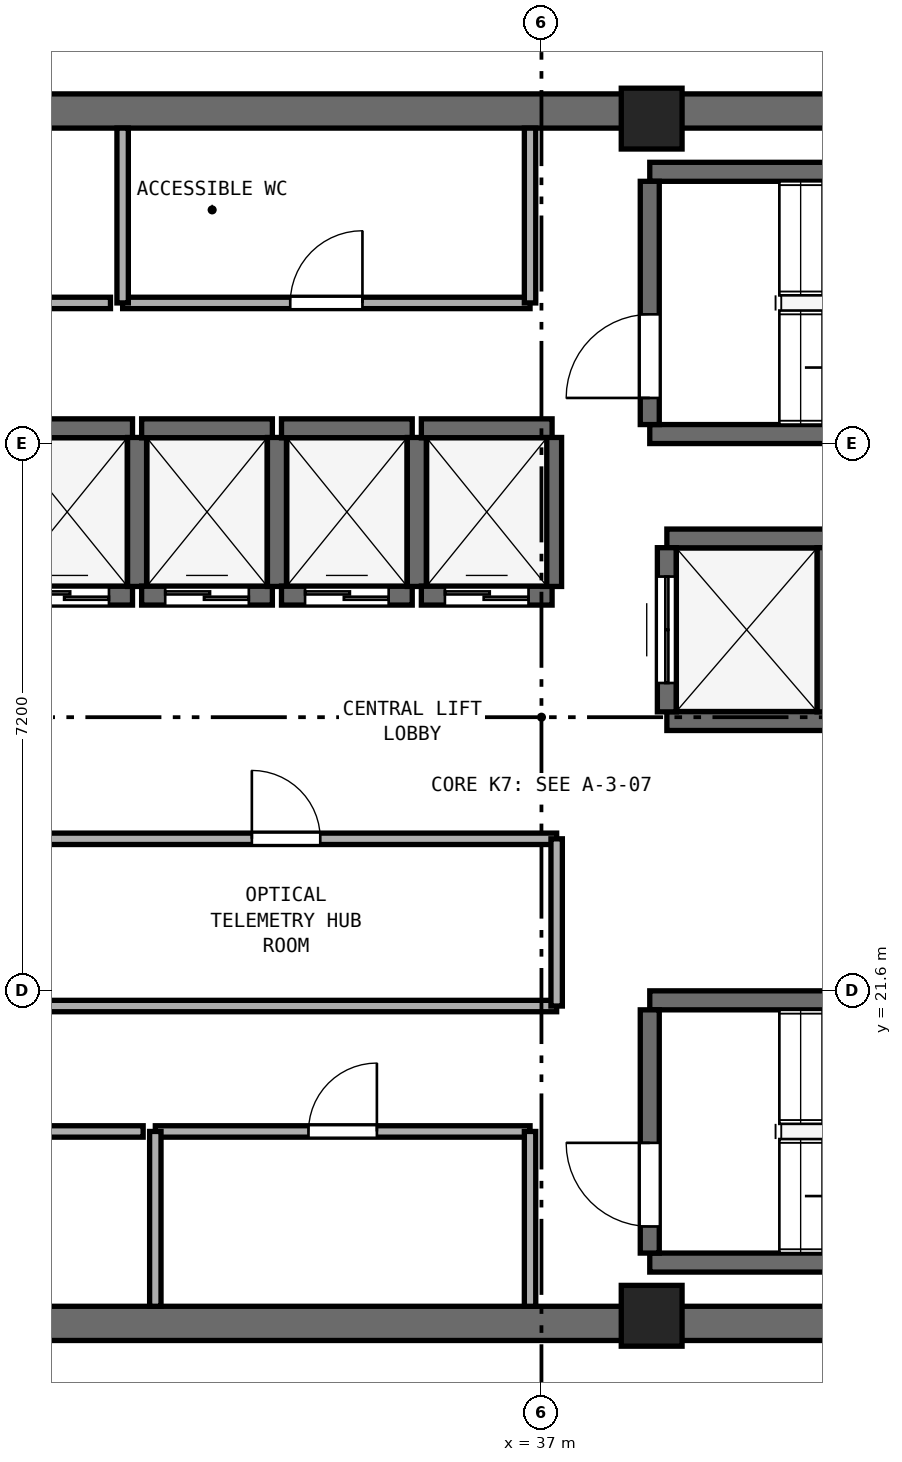
"""IFC4 building model, lengths in metres.
Left out: names, types, materials, properties, quantities, classifications, styles, units other than length and angle.
Written with IfcOpenShell. Run it as: python <this file> out.ifc"""

import sys

from ifc_helpers import new_model, si_unit, direction, frame, frame_2d, origin, origin_2d, place, context, subcontext, project, spatial, rectangle, extrude, element, fill, save


model = new_model("IFC4")
c1 = context("Model", 3, precision=1e-05, world=origin(), true_north=direction((0.0, 1.0)))
c2 = subcontext(c1, "Body", "Model", "MODEL_VIEW")
j1 = project(units=[si_unit("LENGTHUNIT", "METRE"), si_unit("PLANEANGLEUNIT", "RADIAN")], contexts=[c1])
p1 = place(None, origin())
s1 = spatial("IfcSite", under=j1, at=p1, CompositionType="ELEMENT")
p2 = place(p1, origin())
s2 = spatial("IfcBuilding", under=s1, at=p2, CompositionType="ELEMENT")
p3 = place(p2, frame((0.0, 0.0, 259.2)))
s3 = spatial("IfcBuildingStorey", under=s2, at=p3, CompositionType="ELEMENT", Elevation=259.2)
for number, where, z_axis, x_axis in (
    (1, (25.4, 17.225, 0.0), (0.0, 0.0, 1.0), (1.0, 0.0, 0.0)),
    (2, (25.4, 33.175, 0.0), (0.0, 0.0, 1.0), (1.0, 0.0, 0.0)),
):
    element("IfcWall", number, at=place(p3, frame(where, z_axis=z_axis, x_axis=x_axis)), inside=s3, PredefinedType="SHEAR", context=c2, shape_type="SweptSolid", body=[
        extrude(rectangle(XDim=23.2, YDim=0.45, at=frame_2d((11.6, 0.0))), origin(), (0.0, 0.0, 1.0), 3.51),
    ])
for number, where, z_axis, x_axis in (
    (3, (38.45, 17.325, 0.0), (0.0, 0.0, 1.0), (1.0, 0.0, 0.0)),
    (4, (38.45, 33.075, 0.0), (0.0, 0.0, 1.0), (1.0, 0.0, 0.0)),
):
    element("IfcColumn", number, at=place(p3, frame(where, z_axis=z_axis, x_axis=x_axis)), inside=s3, PredefinedType="PILASTER", context=c2, shape_type="SweptSolid", body=[
        extrude(rectangle(XDim=0.8, YDim=0.8, at=origin_2d()), origin(), (0.0, 0.0, 1.0), 3.8),
    ])
for number, where, z_axis, x_axis in (
    (5, (38.425, 28.925, 0.0), (0.0, 0.0, 1.0), (1.0, 0.0, 0.0)),
    (6, (38.425, 32.375, 0.0), (0.0, 0.0, 1.0), (1.0, 0.0, 0.0)),
):
    element("IfcWall", number, at=place(p3, frame(where, z_axis=z_axis, x_axis=x_axis)), inside=s3, PredefinedType="SHEAR", context=c2, shape_type="SweptSolid", body=[
        extrude(rectangle(XDim=7.3, YDim=0.25, at=frame_2d((3.65, 0.0))), origin(), (0.0, 0.0, 1.0), 3.51),
    ])
p4 = place(p3, frame((38.425, 29.05, 0.0), z_axis=(0.0, 0.0, 1.0), x_axis=(0.0, 1.0, 0.0)))
e7 = element("IfcWall", 7, at=p4, inside=s3, PredefinedType="SHEAR", context=c2, shape_type="SweptSolid", body=[
    extrude(rectangle(XDim=3.2, YDim=0.25, at=frame_2d((1.6, 0.0))), origin(), (0.0, 0.0, 1.0), 3.51),
])
p5 = place(p4, frame((0.35, 0.0, 0.0)))
e8 = element("IfcOpeningElement", 8, at=p5, cuts=e7, PredefinedType="OPENING", context=c2, shape_type="SweptSolid", body=[
    extrude(rectangle(XDim=1.1, YDim=2.15, at=frame_2d((0.55, 1.075))), frame((0.0, 0.135, 0.0), z_axis=(0.0, -1.0, 0.0), x_axis=(1.0, 0.0, 0.0)), (0.0, 0.0, 1.0), 0.27),
])
for number, where, z_axis, x_axis in (
    (9, (38.425, 18.025, 0.0), (0.0, 0.0, 1.0), (1.0, 0.0, 0.0)),
    (10, (38.425, 21.475, 0.0), (0.0, 0.0, 1.0), (1.0, 0.0, 0.0)),
):
    element("IfcWall", number, at=place(p3, frame(where, z_axis=z_axis, x_axis=x_axis)), inside=s3, PredefinedType="SHEAR", context=c2, shape_type="SweptSolid", body=[
        extrude(rectangle(XDim=7.3, YDim=0.25, at=frame_2d((3.65, 0.0))), origin(), (0.0, 0.0, 1.0), 3.51),
    ])
p6 = place(p3, frame((38.425, 18.15, 0.0), z_axis=(0.0, 0.0, 1.0), x_axis=(0.0, 1.0, 0.0)))
e11 = element("IfcWall", 11, at=p6, inside=s3, PredefinedType="SHEAR", context=c2, shape_type="SweptSolid", body=[
    extrude(rectangle(XDim=3.2, YDim=0.25, at=frame_2d((1.6, 0.0))), origin(), (0.0, 0.0, 1.0), 3.51),
])
p7 = place(p6, frame((0.35, 0.0, 0.0)))
e12 = element("IfcOpeningElement", 12, at=p7, cuts=e11, PredefinedType="OPENING", context=c2, shape_type="SweptSolid", body=[
    extrude(rectangle(XDim=1.1, YDim=2.15, at=frame_2d((0.55, 1.075))), frame((0.0, 0.135, 0.0), z_axis=(0.0, -1.0, 0.0), x_axis=(1.0, 0.0, 0.0)), (0.0, 0.0, 1.0), 0.27),
])
p8 = place(p3, frame((29.9, 26.8, 0.0), z_axis=(0.0, 0.0, 1.0), x_axis=(1.0, 0.0, 0.0)))
e13 = element("IfcWall", 13, at=p8, inside=s3, PredefinedType="SHEAR", context=c2, shape_type="SweptSolid", body=[
    extrude(rectangle(XDim=1.72, YDim=0.25, at=frame_2d((0.86, 0.0))), origin(), (0.0, 0.0, 1.0), 3.51),
])
p9 = place(p8, frame((0.31, 0.0, 0.0)))
e14 = element("IfcOpeningElement", 14, at=p9, cuts=e13, PredefinedType="OPENING", context=c2, shape_type="SweptSolid", body=[
    extrude(rectangle(XDim=1.1, YDim=2.15, at=frame_2d((0.55, 1.075))), frame((0.0, 0.135, 0.0), z_axis=(0.0, -1.0, 0.0), x_axis=(1.0, 0.0, 0.0)), (0.0, 0.0, 1.0), 0.27),
])
p10 = place(p3, frame((29.9, 29.0, 0.0), z_axis=(0.0, 0.0, 1.0), x_axis=(1.0, 0.0, 0.0)))
e15 = element("IfcWall", 15, at=p10, inside=s3, PredefinedType="SHEAR", context=c2, shape_type="SweptSolid", body=[
    extrude(rectangle(XDim=1.72, YDim=0.25, at=frame_2d((0.86, 0.0))), origin(), (0.0, 0.0, 1.0), 3.51),
])
p11 = place(p3, frame((31.68, 26.92, 0.0), z_axis=(0.0, 0.0, 1.0), x_axis=(0.0, 1.0, 0.0)))
e16 = element("IfcWall", 16, at=p11, inside=s3, PredefinedType="SHEAR", context=c2, shape_type="SweptSolid", body=[
    extrude(rectangle(XDim=1.96, YDim=0.25, at=frame_2d((0.98, 0.0))), origin(), (0.0, 0.0, 1.0), 3.51),
])
p12 = place(p3, frame((31.74, 26.8, 0.0), z_axis=(0.0, 0.0, 1.0), x_axis=(1.0, 0.0, 0.0)))
e17 = element("IfcWall", 17, at=p12, inside=s3, PredefinedType="SHEAR", context=c2, shape_type="SweptSolid", body=[
    extrude(rectangle(XDim=1.72, YDim=0.25, at=frame_2d((0.86, 0.0))), origin(), (0.0, 0.0, 1.0), 3.51),
])
p13 = place(p12, frame((0.31, 0.0, 0.0)))
e18 = element("IfcOpeningElement", 18, at=p13, cuts=e17, PredefinedType="OPENING", context=c2, shape_type="SweptSolid", body=[
    extrude(rectangle(XDim=1.1, YDim=2.15, at=frame_2d((0.55, 1.075))), frame((0.0, 0.135, 0.0), z_axis=(0.0, -1.0, 0.0), x_axis=(1.0, 0.0, 0.0)), (0.0, 0.0, 1.0), 0.27),
])
p14 = place(p3, frame((31.74, 29.0, 0.0), z_axis=(0.0, 0.0, 1.0), x_axis=(1.0, 0.0, 0.0)))
e19 = element("IfcWall", 19, at=p14, inside=s3, PredefinedType="SHEAR", context=c2, shape_type="SweptSolid", body=[
    extrude(rectangle(XDim=1.72, YDim=0.25, at=frame_2d((0.86, 0.0))), origin(), (0.0, 0.0, 1.0), 3.51),
])
p15 = place(p3, frame((33.52, 26.92, 0.0), z_axis=(0.0, 0.0, 1.0), x_axis=(0.0, 1.0, 0.0)))
e20 = element("IfcWall", 20, at=p15, inside=s3, PredefinedType="SHEAR", context=c2, shape_type="SweptSolid", body=[
    extrude(rectangle(XDim=1.96, YDim=0.25, at=frame_2d((0.98, 0.0))), origin(), (0.0, 0.0, 1.0), 3.51),
])
p16 = place(p3, frame((33.58, 26.8, 0.0), z_axis=(0.0, 0.0, 1.0), x_axis=(1.0, 0.0, 0.0)))
e21 = element("IfcWall", 21, at=p16, inside=s3, PredefinedType="SHEAR", context=c2, shape_type="SweptSolid", body=[
    extrude(rectangle(XDim=1.72, YDim=0.25, at=frame_2d((0.86, 0.0))), origin(), (0.0, 0.0, 1.0), 3.51),
])
p17 = place(p16, frame((0.31, 0.0, 0.0)))
e22 = element("IfcOpeningElement", 22, at=p17, cuts=e21, PredefinedType="OPENING", context=c2, shape_type="SweptSolid", body=[
    extrude(rectangle(XDim=1.1, YDim=2.15, at=frame_2d((0.55, 1.075))), frame((0.0, 0.135, 0.0), z_axis=(0.0, -1.0, 0.0), x_axis=(1.0, 0.0, 0.0)), (0.0, 0.0, 1.0), 0.27),
])
p18 = place(p3, frame((33.58, 29.0, 0.0), z_axis=(0.0, 0.0, 1.0), x_axis=(1.0, 0.0, 0.0)))
e23 = element("IfcWall", 23, at=p18, inside=s3, PredefinedType="SHEAR", context=c2, shape_type="SweptSolid", body=[
    extrude(rectangle(XDim=1.72, YDim=0.25, at=frame_2d((0.86, 0.0))), origin(), (0.0, 0.0, 1.0), 3.51),
])
p19 = place(p3, frame((35.36, 26.92, 0.0), z_axis=(0.0, 0.0, 1.0), x_axis=(0.0, 1.0, 0.0)))
e24 = element("IfcWall", 24, at=p19, inside=s3, PredefinedType="SHEAR", context=c2, shape_type="SweptSolid", body=[
    extrude(rectangle(XDim=1.96, YDim=0.25, at=frame_2d((0.98, 0.0))), origin(), (0.0, 0.0, 1.0), 3.51),
])
p20 = place(p3, frame((35.42, 26.8, 0.0), z_axis=(0.0, 0.0, 1.0), x_axis=(1.0, 0.0, 0.0)))
e25 = element("IfcWall", 25, at=p20, inside=s3, PredefinedType="SHEAR", context=c2, shape_type="SweptSolid", body=[
    extrude(rectangle(XDim=1.72, YDim=0.25, at=frame_2d((0.86, 0.0))), origin(), (0.0, 0.0, 1.0), 3.51),
])
p21 = place(p20, frame((0.31, 0.0, 0.0)))
e26 = element("IfcOpeningElement", 26, at=p21, cuts=e25, PredefinedType="OPENING", context=c2, shape_type="SweptSolid", body=[
    extrude(rectangle(XDim=1.1, YDim=2.15, at=frame_2d((0.55, 1.075))), frame((0.0, 0.135, 0.0), z_axis=(0.0, -1.0, 0.0), x_axis=(1.0, 0.0, 0.0)), (0.0, 0.0, 1.0), 0.27),
])
p22 = place(p3, frame((35.42, 29.0, 0.0), z_axis=(0.0, 0.0, 1.0), x_axis=(1.0, 0.0, 0.0)))
e27 = element("IfcWall", 27, at=p22, inside=s3, PredefinedType="SHEAR", context=c2, shape_type="SweptSolid", body=[
    extrude(rectangle(XDim=1.72, YDim=0.25, at=frame_2d((0.86, 0.0))), origin(), (0.0, 0.0, 1.0), 3.51),
])
p23 = place(p3, frame((37.14, 26.92, 0.0), z_axis=(0.0, 0.0, 1.0), x_axis=(0.0, 1.0, 0.0)))
e28 = element("IfcWall", 28, at=p23, inside=s3, PredefinedType="SHEAR", context=c2, shape_type="SweptSolid", body=[
    extrude(rectangle(XDim=1.96, YDim=0.25, at=frame_2d((0.98, 0.0))), origin(), (0.0, 0.0, 1.0), 3.51),
])
for number, where, z_axis, x_axis in (
    (29, (38.65, 25.15, 0.0), (0.0, 0.0, 1.0), (1.0, 0.0, 0.0)),
    (30, (38.65, 27.55, 0.0), (0.0, 0.0, 1.0), (1.0, 0.0, 0.0)),
):
    element("IfcWall", number, at=place(p3, frame(where, z_axis=z_axis, x_axis=x_axis)), inside=s3, PredefinedType="SHEAR", context=c2, shape_type="SweptSolid", body=[
        extrude(rectangle(XDim=2.1, YDim=0.25, at=frame_2d((1.05, 0.0))), origin(), (0.0, 0.0, 1.0), 3.51),
    ])
p24 = place(p3, frame((38.65, 25.27, 0.0), z_axis=(0.0, 0.0, 1.0), x_axis=(0.0, 1.0, 0.0)))
e31 = element("IfcWall", 31, at=p24, inside=s3, PredefinedType="SHEAR", context=c2, shape_type="SweptSolid", body=[
    extrude(rectangle(XDim=2.16, YDim=0.25, at=frame_2d((1.08, 0.0))), origin(), (0.0, 0.0, 1.0), 3.51),
])
p25 = place(p24, frame((0.38, 0.0, 0.0)))
e32 = element("IfcOpeningElement", 32, at=p25, cuts=e31, PredefinedType="OPENING", context=c2, shape_type="SweptSolid", body=[
    extrude(rectangle(XDim=1.4, YDim=2.2, at=frame_2d((0.7, 1.1))), frame((0.0, 0.135, 0.0), z_axis=(0.0, -1.0, 0.0), x_axis=(1.0, 0.0, 0.0)), (0.0, 0.0, 1.0), 0.27),
])
p26 = place(p3, frame((40.75, 25.27, 0.0), z_axis=(0.0, 0.0, 1.0), x_axis=(0.0, 1.0, 0.0)))
e33 = element("IfcWall", 33, at=p26, inside=s3, PredefinedType="SHEAR", context=c2, shape_type="SweptSolid", body=[
    extrude(rectangle(XDim=2.16, YDim=0.25, at=frame_2d((1.08, 0.0))), origin(), (0.0, 0.0, 1.0), 3.51),
])
p27 = place(p3, frame((25.97, 30.65, 0.0), z_axis=(0.0, 0.0, 1.0), x_axis=(1.0, 0.0, 0.0)))
e34 = element("IfcWall", 34, at=p27, inside=s3, PredefinedType="PARTITIONING", context=c2, shape_type="SweptSolid", body=[
    extrude(rectangle(XDim=5.36, YDim=0.15, at=frame_2d((2.68, 0.0))), origin(), (0.0, 0.0, 1.0), 3.51),
])
p28 = place(p27, frame((2.205, 0.0, 0.0)))
e35 = element("IfcOpeningElement", 35, at=p28, cuts=e34, PredefinedType="OPENING", context=c2, shape_type="SweptSolid", body=[
    extrude(rectangle(XDim=0.95, YDim=2.1, at=frame_2d((0.475, 1.05))), frame((0.0, 0.085, 0.0), z_axis=(0.0, -1.0, 0.0), x_axis=(1.0, 0.0, 0.0)), (0.0, 0.0, 1.0), 0.17),
])
p29 = place(p3, frame((31.49, 30.65, 0.0), z_axis=(0.0, 0.0, 1.0), x_axis=(1.0, 0.0, 0.0)))
e36 = element("IfcWall", 36, at=p29, inside=s3, PredefinedType="PARTITIONING", context=c2, shape_type="SweptSolid", body=[
    extrude(rectangle(XDim=5.36, YDim=0.15, at=frame_2d((2.68, 0.0))), origin(), (0.0, 0.0, 1.0), 3.51),
])
p30 = place(p29, frame((2.205, 0.0, 0.0)))
e37 = element("IfcOpeningElement", 37, at=p30, cuts=e36, PredefinedType="OPENING", context=c2, shape_type="SweptSolid", body=[
    extrude(rectangle(XDim=0.95, YDim=2.1, at=frame_2d((0.475, 1.05))), frame((0.0, 0.085, 0.0), z_axis=(0.0, -1.0, 0.0), x_axis=(1.0, 0.0, 0.0)), (0.0, 0.0, 1.0), 0.17),
])
for number, where, z_axis, x_axis in (
    (38, (31.49, 30.65, 0.0), (0.0, 0.0, 1.0), (0.0, 1.0, 0.0)),
    (39, (36.85, 30.65, 0.0), (0.0, 0.0, 1.0), (0.0, 1.0, 0.0)),
):
    element("IfcWall", number, at=place(p3, frame(where, z_axis=z_axis, x_axis=x_axis)), inside=s3, PredefinedType="PARTITIONING", context=c2, shape_type="SweptSolid", body=[
        extrude(rectangle(XDim=2.3, YDim=0.15, at=frame_2d((1.15, 0.0))), origin(), (0.0, 0.0, 1.0), 3.51),
    ])
p31 = place(p3, frame((25.97, 19.75, 0.0), z_axis=(0.0, 0.0, 1.0), x_axis=(1.0, 0.0, 0.0)))
e40 = element("IfcWall", 40, at=p31, inside=s3, PredefinedType="PARTITIONING", context=c2, shape_type="SweptSolid", body=[
    extrude(rectangle(XDim=5.79, YDim=0.15, at=frame_2d((2.895, 0.0))), origin(), (0.0, 0.0, 1.0), 3.51),
])
p32 = place(p31, frame((2.42, 0.0, 0.0)))
e41 = element("IfcOpeningElement", 41, at=p32, cuts=e40, PredefinedType="OPENING", context=c2, shape_type="SweptSolid", body=[
    extrude(rectangle(XDim=0.95, YDim=2.1, at=frame_2d((0.475, 1.05))), frame((0.0, 0.085, 0.0), z_axis=(0.0, -1.0, 0.0), x_axis=(1.0, 0.0, 0.0)), (0.0, 0.0, 1.0), 0.17),
])
p33 = place(p3, frame((31.92, 19.75, 0.0), z_axis=(0.0, 0.0, 1.0), x_axis=(1.0, 0.0, 0.0)))
e42 = element("IfcWall", 42, at=p33, inside=s3, PredefinedType="PARTITIONING", context=c2, shape_type="SweptSolid", body=[
    extrude(rectangle(XDim=4.93, YDim=0.15, at=frame_2d((2.465, 0.0))), origin(), (0.0, 0.0, 1.0), 3.51),
])
p34 = place(p33, frame((2.015, 0.0, 0.0)))
e43 = element("IfcOpeningElement", 43, at=p34, cuts=e42, PredefinedType="OPENING", context=c2, shape_type="SweptSolid", body=[
    extrude(rectangle(XDim=0.9, YDim=2.1, at=frame_2d((0.45, 1.05))), frame((0.0, 0.085, 0.0), z_axis=(0.0, -1.0, 0.0), x_axis=(1.0, 0.0, 0.0)), (0.0, 0.0, 1.0), 0.17),
])
for number, where, z_axis, x_axis in (
    (44, (31.92, 17.45, 0.0), (0.0, 0.0, 1.0), (0.0, 1.0, 0.0)),
    (45, (36.85, 17.45, 0.0), (0.0, 0.0, 1.0), (0.0, 1.0, 0.0)),
):
    element("IfcWall", number, at=place(p3, frame(where, z_axis=z_axis, x_axis=x_axis)), inside=s3, PredefinedType="PARTITIONING", context=c2, shape_type="SweptSolid", body=[
        extrude(rectangle(XDim=2.3, YDim=0.15, at=frame_2d((1.15, 0.0))), origin(), (0.0, 0.0, 1.0), 3.51),
    ])
p35 = place(p3, frame((30.08, 21.4, 0.0), z_axis=(0.0, 0.0, 1.0), x_axis=(1.0, 0.0, 0.0)))
e46 = element("IfcWall", 46, at=p35, inside=s3, PredefinedType="PARTITIONING", context=c2, shape_type="SweptSolid", body=[
    extrude(rectangle(XDim=7.12, YDim=0.15, at=frame_2d((3.56, 0.0))), origin(), (0.0, 0.0, 1.0), 3.51),
])
p36 = place(p3, frame((30.08, 23.6, 0.0), z_axis=(0.0, 0.0, 1.0), x_axis=(1.0, 0.0, 0.0)))
e47 = element("IfcWall", 47, at=p36, inside=s3, PredefinedType="PARTITIONING", context=c2, shape_type="SweptSolid", body=[
    extrude(rectangle(XDim=7.12, YDim=0.15, at=frame_2d((3.56, 0.0))), origin(), (0.0, 0.0, 1.0), 3.51),
])
p37 = place(p36, frame((3.11, 0.0, 0.0)))
e48 = element("IfcOpeningElement", 48, at=p37, cuts=e47, PredefinedType="OPENING", context=c2, shape_type="SweptSolid", body=[
    extrude(rectangle(XDim=0.9, YDim=2.1, at=frame_2d((0.45, 1.05))), frame((0.0, 0.085, 0.0), z_axis=(0.0, -1.0, 0.0), x_axis=(1.0, 0.0, 0.0)), (0.0, 0.0, 1.0), 0.17),
])
p38 = place(p3, frame((37.2, 21.4, 0.0), z_axis=(0.0, 0.0, 1.0), x_axis=(0.0, 1.0, 0.0)))
e49 = element("IfcWall", 49, at=p38, inside=s3, PredefinedType="PARTITIONING", context=c2, shape_type="SweptSolid", body=[
    extrude(rectangle(XDim=2.2, YDim=0.15, at=frame_2d((1.1, 0.0))), origin(), (0.0, 0.0, 1.0), 3.51),
])
p39 = place(p5, origin())
e50 = element("IfcDoor", 50, at=p39, inside=s3, OperationType="SINGLE_SWING_LEFT", PredefinedType="DOOR", context=c2, shape_type="SweptSolid", body=[
    extrude(rectangle(XDim=1.1, YDim=2.15, at=frame_2d((0.55, 1.075))), frame((0.0, 0.025, 0.0), z_axis=(0.0, -1.0, 0.0), x_axis=(1.0, 0.0, 0.0)), (0.0, 0.0, 1.0), 0.05),
])
fill(e8, e50)
p40 = place(p7, origin())
e51 = element("IfcDoor", 51, at=p40, inside=s3, OperationType="SINGLE_SWING_RIGHT", PredefinedType="DOOR", context=c2, shape_type="SweptSolid", body=[
    extrude(rectangle(XDim=1.1, YDim=2.15, at=frame_2d((0.55, 1.075))), frame((0.0, 0.025, 0.0), z_axis=(0.0, -1.0, 0.0), x_axis=(1.0, 0.0, 0.0)), (0.0, 0.0, 1.0), 0.05),
])
fill(e12, e51)
p41 = place(p9, origin())
e52 = element("IfcDoor", 52, at=p41, inside=s3, OperationType="DOUBLE_DOOR_SLIDING", PredefinedType="DOOR", context=c2, shape_type="SweptSolid", body=[
    extrude(rectangle(XDim=1.1, YDim=2.15, at=frame_2d((0.55, 1.075))), frame((0.0, 0.025, 0.0), z_axis=(0.0, -1.0, 0.0), x_axis=(1.0, 0.0, 0.0)), (0.0, 0.0, 1.0), 0.05),
])
fill(e14, e52)
p42 = place(p13, origin())
e53 = element("IfcDoor", 53, at=p42, inside=s3, OperationType="DOUBLE_DOOR_SLIDING", PredefinedType="DOOR", context=c2, shape_type="SweptSolid", body=[
    extrude(rectangle(XDim=1.1, YDim=2.15, at=frame_2d((0.55, 1.075))), frame((0.0, 0.025, 0.0), z_axis=(0.0, -1.0, 0.0), x_axis=(1.0, 0.0, 0.0)), (0.0, 0.0, 1.0), 0.05),
])
fill(e18, e53)
p43 = place(p17, origin())
e54 = element("IfcDoor", 54, at=p43, inside=s3, OperationType="DOUBLE_DOOR_SLIDING", PredefinedType="DOOR", context=c2, shape_type="SweptSolid", body=[
    extrude(rectangle(XDim=1.1, YDim=2.15, at=frame_2d((0.55, 1.075))), frame((0.0, 0.025, 0.0), z_axis=(0.0, -1.0, 0.0), x_axis=(1.0, 0.0, 0.0)), (0.0, 0.0, 1.0), 0.05),
])
fill(e22, e54)
p44 = place(p21, origin())
e55 = element("IfcDoor", 55, at=p44, inside=s3, OperationType="DOUBLE_DOOR_SLIDING", PredefinedType="DOOR", context=c2, shape_type="SweptSolid", body=[
    extrude(rectangle(XDim=1.1, YDim=2.15, at=frame_2d((0.55, 1.075))), frame((0.0, 0.025, 0.0), z_axis=(0.0, -1.0, 0.0), x_axis=(1.0, 0.0, 0.0)), (0.0, 0.0, 1.0), 0.05),
])
fill(e26, e55)
p45 = place(p25, origin())
e56 = element("IfcDoor", 56, at=p45, inside=s3, OperationType="DOUBLE_DOOR_SLIDING", PredefinedType="DOOR", context=c2, shape_type="SweptSolid", body=[
    extrude(rectangle(XDim=1.4, YDim=2.2, at=frame_2d((0.7, 1.1))), frame((0.0, 0.025, 0.0), z_axis=(0.0, -1.0, 0.0), x_axis=(1.0, 0.0, 0.0)), (0.0, 0.0, 1.0), 0.05),
])
fill(e32, e56)
p46 = place(p30, origin())
e57 = element("IfcDoor", 57, at=p46, inside=s3, OperationType="SINGLE_SWING_RIGHT", PredefinedType="DOOR", context=c2, shape_type="SweptSolid", body=[
    extrude(rectangle(XDim=0.95, YDim=2.1, at=frame_2d((0.475, 1.05))), frame((0.0, 0.025, 0.0), z_axis=(0.0, -1.0, 0.0), x_axis=(1.0, 0.0, 0.0)), (0.0, 0.0, 1.0), 0.05),
])
fill(e37, e57)
p47 = place(p34, origin())
e58 = element("IfcDoor", 58, at=p47, inside=s3, OperationType="SINGLE_SWING_RIGHT", PredefinedType="DOOR", context=c2, shape_type="SweptSolid", body=[
    extrude(rectangle(XDim=0.9, YDim=2.1, at=frame_2d((0.45, 1.05))), frame((0.0, 0.025, 0.0), z_axis=(0.0, -1.0, 0.0), x_axis=(1.0, 0.0, 0.0)), (0.0, 0.0, 1.0), 0.05),
])
fill(e43, e58)
p48 = place(p37, origin())
e59 = element("IfcDoor", 59, at=p48, inside=s3, OperationType="SINGLE_SWING_LEFT", PredefinedType="DOOR", context=c2, shape_type="SweptSolid", body=[
    extrude(rectangle(XDim=0.9, YDim=2.1, at=frame_2d((0.45, 1.05))), frame((0.0, 0.025, 0.0), z_axis=(0.0, -1.0, 0.0), x_axis=(1.0, 0.0, 0.0)), (0.0, 0.0, 1.0), 0.05),
])
fill(e48, e59)
save(model, sys.argv[1])
